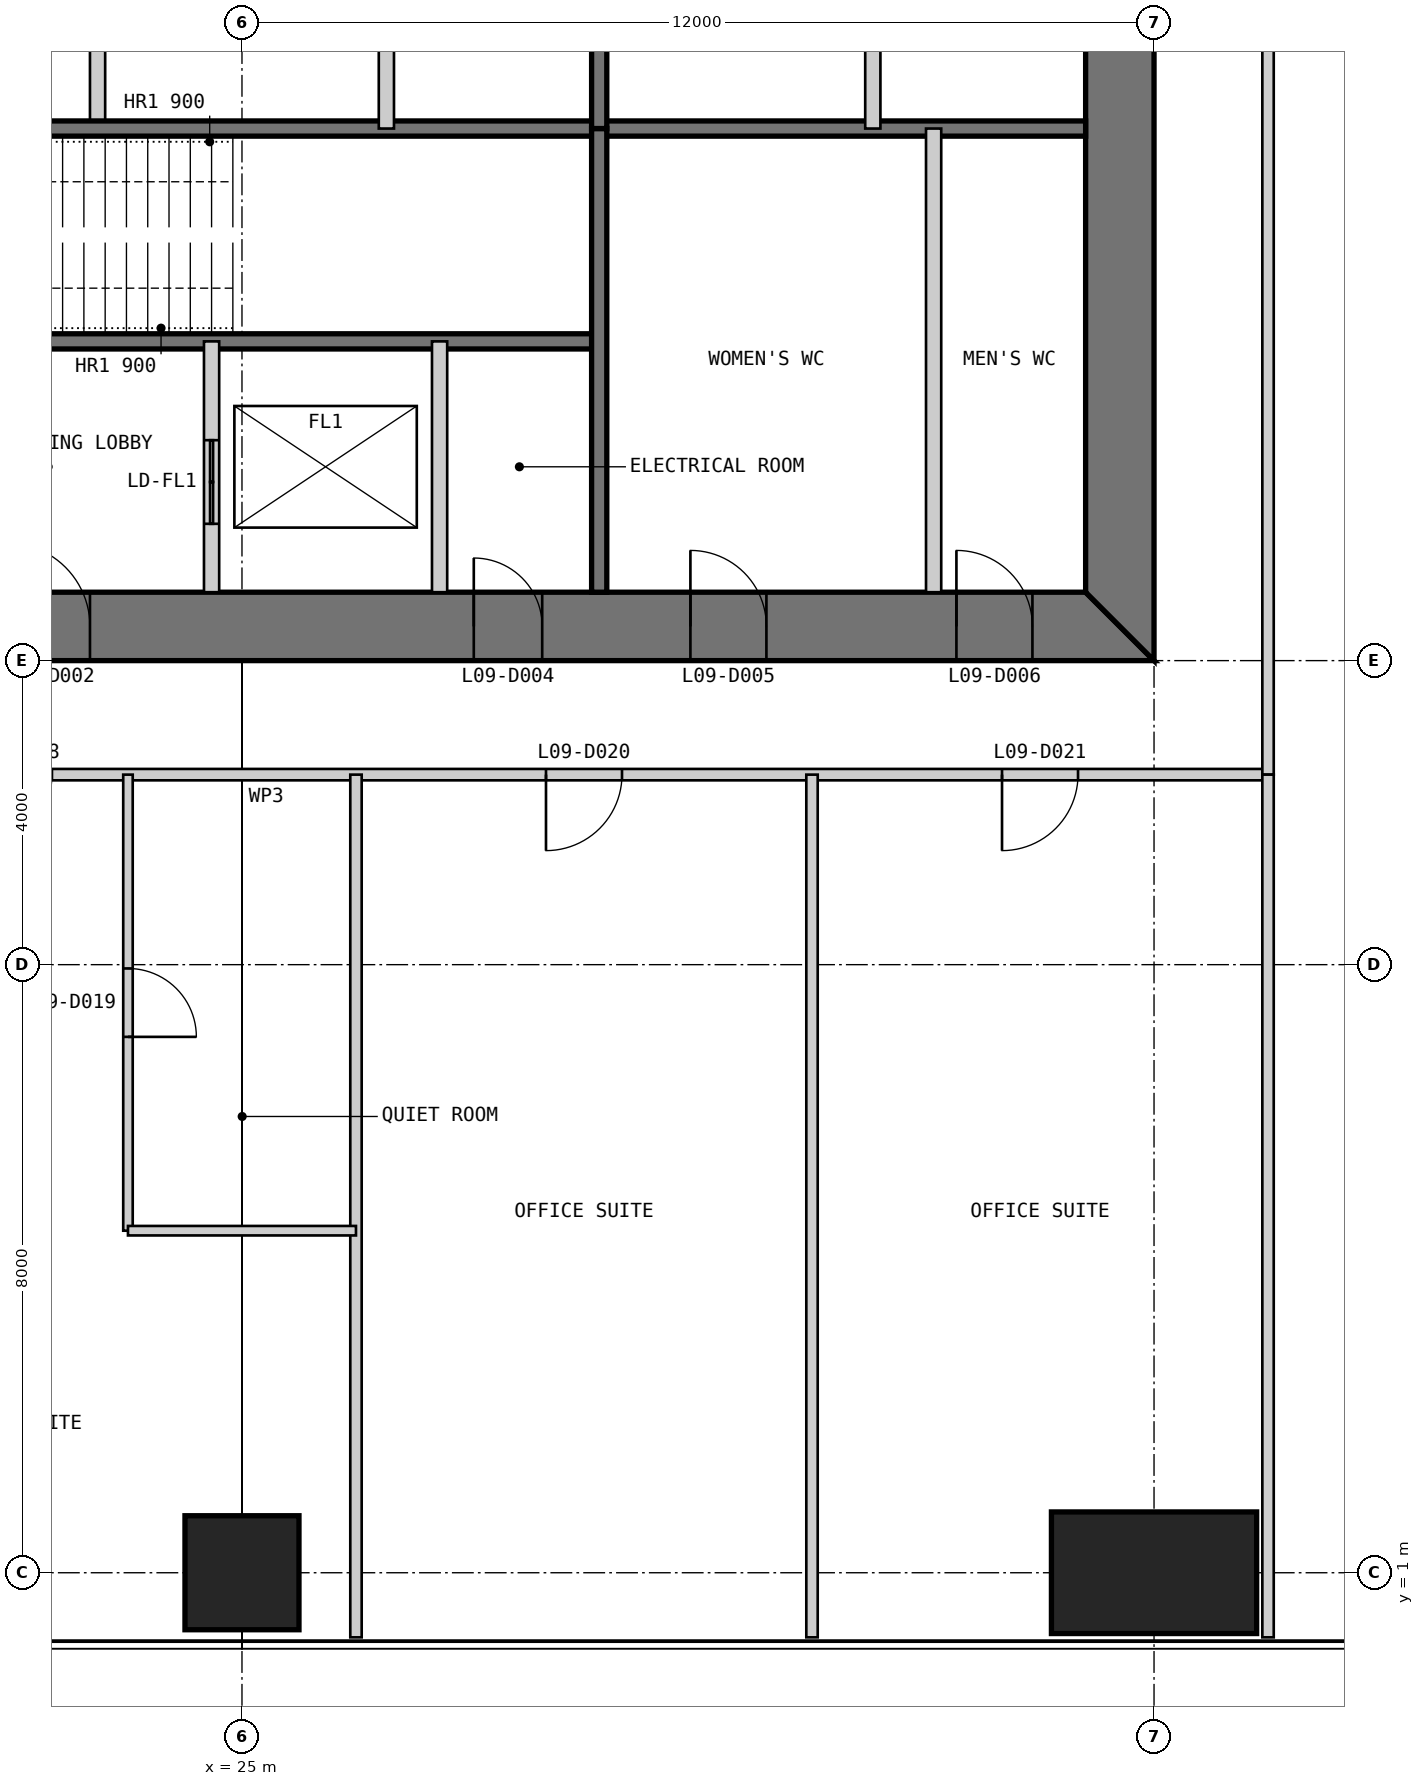
"""IFC4 building model, lengths in metres.
Left out: names, types, materials, properties, quantities, classifications, styles, units other than length and angle.
Written with IfcOpenShell. Run it as: python <this file> out.ifc"""

import sys

from ifc_helpers import new_model, si_unit, direction, frame, frame_2d, origin, origin_2d, place, context, subcontext, project, spatial, polyline, rectangle, outline, extrude, element, fill, save


model = new_model("IFC4")
c1 = context("Model", 3, precision=1e-05, world=origin(), true_north=direction((0.0, 1.0)))
c2 = subcontext(c1, "Body", "Model", "MODEL_VIEW")
j1 = project(units=[si_unit("LENGTHUNIT", "METRE"), si_unit("PLANEANGLEUNIT", "RADIAN")], contexts=[c1])
p1 = place(None, origin())
s1 = spatial("IfcSite", under=j1, at=p1, CompositionType="ELEMENT")
p2 = place(p1, origin())
s2 = spatial("IfcBuilding", under=s1, at=p2, CompositionType="ELEMENT")
p3 = place(p2, frame((0.0, 0.0, 43.0)))
s3 = spatial("IfcBuildingStorey", under=s2, at=p3, CompositionType="ELEMENT", Elevation=43.0)
p4 = place(p3, frame((25.0, 1.0, 0.0), z_axis=(0.0, 0.0, 1.0), x_axis=(1.0, 0.0, 0.0)))
e1 = element("IfcColumn", 1, at=p4, inside=s3, PredefinedType="COLUMN", context=c2, shape_type="SweptSolid", body=[
    extrude(rectangle(XDim=1.5, YDim=1.5, at=origin_2d()), origin(), (0.0, 0.0, 1.0), 4.0),
])
p5 = place(p3, frame((37.0, 1.0, 0.0), z_axis=(0.0, 0.0, 1.0), x_axis=(1.0, 0.0, 0.0)))
e2 = element("IfcColumn", 2, at=p5, inside=s3, PredefinedType="COLUMN", context=c2, shape_type="SweptSolid", body=[
    extrude(rectangle(XDim=2.7, YDim=1.6, at=origin_2d()), origin(), (0.0, 0.0, 1.0), 4.0),
])
p6 = place(p3, frame((13.0, 13.45, 0.0), z_axis=(0.0, 0.0, 1.0), x_axis=(1.0, 0.0, 0.0)))
e3 = element("IfcWall", 3, at=p6, inside=s3, PredefinedType="SHEAR", context=c2, shape_type="SweptSolid", body=[
    extrude(outline(polyline([(0.0, -0.45), (24.0, -0.45), (23.1, 0.45), (0.9, 0.45), (0.0, -0.45)])), origin(), (0.0, 0.0, 1.0), 4.0),
])
p7 = place(p6, frame((4.9, 0.0, 0.0)))
e4 = element("IfcOpeningElement", 4, at=p7, cuts=e3, PredefinedType="OPENING", context=c2, shape_type="SweptSolid", body=[
    extrude(rectangle(XDim=1.0, YDim=2.2, at=frame_2d((0.5, 1.1))), frame((0.0, 0.46, 0.0), z_axis=(0.0, -1.0, 0.0), x_axis=(1.0, 0.0, 0.0)), (0.0, 0.0, 1.0), 0.92),
])
p8 = place(p6, frame((8.9, 0.0, 0.0)))
e5 = element("IfcOpeningElement", 5, at=p8, cuts=e3, PredefinedType="OPENING", context=c2, shape_type="SweptSolid", body=[
    extrude(rectangle(XDim=1.1, YDim=2.2, at=frame_2d((0.55, 1.1))), frame((0.0, 0.46, 0.0), z_axis=(0.0, -1.0, 0.0), x_axis=(1.0, 0.0, 0.0)), (0.0, 0.0, 1.0), 0.92),
])
p9 = place(p6, frame((15.05, 0.0, 0.0)))
e6 = element("IfcOpeningElement", 6, at=p9, cuts=e3, PredefinedType="OPENING", context=c2, shape_type="SweptSolid", body=[
    extrude(rectangle(XDim=0.9, YDim=2.2, at=frame_2d((0.45, 1.1))), frame((0.0, 0.46, 0.0), z_axis=(0.0, -1.0, 0.0), x_axis=(1.0, 0.0, 0.0)), (0.0, 0.0, 1.0), 0.92),
])
p10 = place(p6, frame((17.9, 0.0, 0.0)))
e7 = element("IfcOpeningElement", 7, at=p10, cuts=e3, PredefinedType="OPENING", context=c2, shape_type="SweptSolid", body=[
    extrude(rectangle(XDim=1.0, YDim=2.2, at=frame_2d((0.5, 1.1))), frame((0.0, 0.46, 0.0), z_axis=(0.0, -1.0, 0.0), x_axis=(1.0, 0.0, 0.0)), (0.0, 0.0, 1.0), 0.92),
])
p11 = place(p6, frame((21.4, 0.0, 0.0)))
e8 = element("IfcOpeningElement", 8, at=p11, cuts=e3, PredefinedType="OPENING", context=c2, shape_type="SweptSolid", body=[
    extrude(rectangle(XDim=1.0, YDim=2.2, at=frame_2d((0.5, 1.1))), frame((0.0, 0.46, 0.0), z_axis=(0.0, -1.0, 0.0), x_axis=(1.0, 0.0, 0.0)), (0.0, 0.0, 1.0), 0.92),
])
p12 = place(p3, frame((36.55, 13.9, 0.0), z_axis=(0.0, 0.0, 1.0), x_axis=(0.0, 1.0, 0.0)))
e9 = element("IfcWall", 9, at=p12, inside=s3, PredefinedType="SHEAR", context=c2, shape_type="SweptSolid", body=[
    extrude(outline(polyline([(-0.9, -0.45), (23.1, -0.45), (22.2, 0.45), (0.0, 0.45), (-0.9, -0.45)])), origin(), (0.0, 0.0, 1.0), 4.0),
])
p13 = place(p12, frame((20.2, 0.0, 0.0)))
e10 = element("IfcOpeningElement", 10, at=p13, cuts=e9, PredefinedType="OPENING", context=c2, shape_type="SweptSolid", body=[
    extrude(rectangle(XDim=1.0, YDim=2.2, at=frame_2d((0.5, 1.1))), frame((0.0, 0.46, 0.0), z_axis=(0.0, -1.0, 0.0), x_axis=(1.0, 0.0, 0.0)), (0.0, 0.0, 1.0), 0.92),
])
p14 = place(p12, frame((17.25, 0.0, 0.0)))
e11 = element("IfcOpeningElement", 11, at=p14, cuts=e9, PredefinedType="OPENING", context=c2, shape_type="SweptSolid", body=[
    extrude(rectangle(XDim=0.9, YDim=2.2, at=frame_2d((0.45, 1.1))), frame((0.0, 0.46, 0.0), z_axis=(0.0, -1.0, 0.0), x_axis=(1.0, 0.0, 0.0)), (0.0, 0.0, 1.0), 0.92),
])
p15 = place(p3, frame((23.1, 20.0, 0.0), z_axis=(0.0, 0.0, 1.0), x_axis=(0.0, 1.0, 0.0)))
e12 = element("IfcWall", 12, at=p15, inside=s3, PredefinedType="PARTITIONING", context=c2, shape_type="SweptSolid", body=[
    extrude(rectangle(XDim=10.0, YDim=0.2, at=frame_2d((5.0, 0.0))), origin(), (0.0, 0.0, 1.0), 3.8),
])
p16 = place(p3, frame((20.3, 17.2, 0.0), z_axis=(0.0, 0.0, 1.0), x_axis=(1.0, 0.0, 0.0)))
e13 = element("IfcWall", 13, at=p16, inside=s3, PredefinedType="SOLIDWALL", context=c2, shape_type="SweptSolid", body=[
    extrude(rectangle(XDim=9.4, YDim=0.2, at=frame_2d((4.7, 0.0))), origin(), (0.0, 0.0, 1.0), 3.8),
])
p17 = place(p16, frame((0.25, 0.0, 0.0)))
e14 = element("IfcOpeningElement", 14, at=p17, cuts=e13, PredefinedType="OPENING", context=c2, shape_type="SweptSolid", body=[
    extrude(rectangle(XDim=1.0, YDim=2.2, at=frame_2d((0.5, 1.1))), frame((0.0, 0.11, 0.0), z_axis=(0.0, -1.0, 0.0), x_axis=(1.0, 0.0, 0.0)), (0.0, 0.0, 1.0), 0.22),
])
p18 = place(p3, frame((20.3, 20.0, 0.0), z_axis=(0.0, 0.0, 1.0), x_axis=(1.0, 0.0, 0.0)))
e15 = element("IfcWall", 15, at=p18, inside=s3, PredefinedType="SOLIDWALL", context=c2, shape_type="SweptSolid", body=[
    extrude(rectangle(XDim=15.8, YDim=0.2, at=frame_2d((7.9, 0.0))), origin(), (0.0, 0.0, 1.0), 3.8),
])
p19 = place(p3, frame((24.6, 13.9, 0.0), z_axis=(0.0, 0.0, 1.0), x_axis=(0.0, 1.0, 0.0)))
e16 = element("IfcWall", 16, at=p19, inside=s3, PredefinedType="PARTITIONING", context=c2, shape_type="SweptSolid", body=[
    extrude(rectangle(XDim=3.3, YDim=0.2, at=frame_2d((1.65, 0.0))), origin(), (0.0, 0.0, 1.0), 3.8),
])
p20 = place(p19, frame((0.9, 0.0, 0.0)))
e17 = element("IfcOpeningElement", 17, at=p20, cuts=e16, PredefinedType="OPENING", context=c2, shape_type="SweptSolid", body=[
    extrude(rectangle(XDim=1.1, YDim=2.2, at=frame_2d((0.55, 1.1))), frame((0.0, 0.11, 0.0), z_axis=(0.0, -1.0, 0.0), x_axis=(1.0, 0.0, 0.0)), (0.0, 0.0, 1.0), 0.22),
])
p21 = place(p3, frame((27.6, 13.9, 0.0), z_axis=(0.0, 0.0, 1.0), x_axis=(0.0, 1.0, 0.0)))
e18 = element("IfcWall", 18, at=p21, inside=s3, PredefinedType="PARTITIONING", context=c2, shape_type="SweptSolid", body=[
    extrude(rectangle(XDim=3.3, YDim=0.2, at=frame_2d((1.65, 0.0))), origin(), (0.0, 0.0, 1.0), 3.8),
])
p22 = place(p3, frame((29.7, 13.9, 0.0), z_axis=(0.0, 0.0, 1.0), x_axis=(0.0, 1.0, 0.0)))
e19 = element("IfcWall", 19, at=p22, inside=s3, PredefinedType="SOLIDWALL", context=c2, shape_type="SweptSolid", body=[
    extrude(rectangle(XDim=6.1, YDim=0.2, at=frame_2d((3.05, 0.0))), origin(), (0.0, 0.0, 1.0), 3.8),
])
p23 = place(p3, frame((34.1, 13.9, 0.0), z_axis=(0.0, 0.0, 1.0), x_axis=(0.0, 1.0, 0.0)))
e20 = element("IfcWall", 20, at=p23, inside=s3, PredefinedType="PARTITIONING", context=c2, shape_type="SweptSolid", body=[
    extrude(rectangle(XDim=6.1, YDim=0.2, at=frame_2d((3.05, 0.0))), origin(), (0.0, 0.0, 1.0), 3.8),
])
p24 = place(p3, frame((33.3, 36.1, 0.0), z_axis=(0.0, 0.0, 1.0), x_axis=(0.0, -1.0, 0.0)))
e21 = element("IfcWall", 21, at=p24, inside=s3, PredefinedType="PARTITIONING", context=c2, shape_type="SweptSolid", body=[
    extrude(rectangle(XDim=16.1, YDim=0.2, at=frame_2d((8.05, 0.0))), origin(), (0.0, 0.0, 1.0), 3.8),
])
p25 = place(p3, frame((29.7, 36.1, 0.0), z_axis=(0.0, 0.0, 1.0), x_axis=(0.0, -1.0, 0.0)))
e22 = element("IfcWall", 22, at=p25, inside=s3, PredefinedType="SOLIDWALL", context=c2, shape_type="SweptSolid", body=[
    extrude(rectangle(XDim=16.1, YDim=0.2, at=frame_2d((8.05, 0.0))), origin(), (0.0, 0.0, 1.0), 3.8),
])
p26 = place(p3, frame((26.9, 30.0, 0.0), z_axis=(0.0, 0.0, 1.0), x_axis=(0.0, -1.0, 0.0)))
e23 = element("IfcWall", 23, at=p26, inside=s3, PredefinedType="PARTITIONING", context=c2, shape_type="SweptSolid", body=[
    extrude(rectangle(XDim=10.0, YDim=0.2, at=frame_2d((5.0, 0.0))), origin(), (0.0, 0.0, 1.0), 3.8),
])
p27 = place(p3, frame((11.5, 11.5, 0.0), z_axis=(0.0, 0.0, 1.0), x_axis=(1.0, 0.0, 0.0)))
e24 = element("IfcWall", 24, at=p27, inside=s3, PredefinedType="PARTITIONING", context=c2, shape_type="SweptSolid", body=[
    extrude(rectangle(XDim=27.0, YDim=0.15, at=frame_2d((13.5, 0.0))), origin(), (0.0, 0.0, 1.0), 3.85),
])
p28 = place(p27, frame((4.0, 0.0, 0.0)))
e25 = element("IfcOpeningElement", 25, at=p28, cuts=e24, PredefinedType="OPENING", context=c2, shape_type="SweptSolid", body=[
    extrude(rectangle(XDim=1.0, YDim=2.2, at=frame_2d((0.5, 1.1))), frame((0.0, 0.085, 0.0), z_axis=(0.0, -1.0, 0.0), x_axis=(1.0, 0.0, 0.0)), (0.0, 0.0, 1.0), 0.17),
])
p29 = place(p27, frame((10.0, 0.0, 0.0)))
e26 = element("IfcOpeningElement", 26, at=p29, cuts=e24, PredefinedType="OPENING", context=c2, shape_type="SweptSolid", body=[
    extrude(rectangle(XDim=1.0, YDim=2.2, at=frame_2d((0.5, 1.1))), frame((0.0, 0.085, 0.0), z_axis=(0.0, -1.0, 0.0), x_axis=(1.0, 0.0, 0.0)), (0.0, 0.0, 1.0), 0.17),
])
p30 = place(p27, frame((17.5, 0.0, 0.0)))
e27 = element("IfcOpeningElement", 27, at=p30, cuts=e24, PredefinedType="OPENING", context=c2, shape_type="SweptSolid", body=[
    extrude(rectangle(XDim=1.0, YDim=2.2, at=frame_2d((0.5, 1.1))), frame((0.0, 0.085, 0.0), z_axis=(0.0, -1.0, 0.0), x_axis=(1.0, 0.0, 0.0)), (0.0, 0.0, 1.0), 0.17),
])
p31 = place(p27, frame((23.5, 0.0, 0.0)))
e28 = element("IfcOpeningElement", 28, at=p31, cuts=e24, PredefinedType="OPENING", context=c2, shape_type="SweptSolid", body=[
    extrude(rectangle(XDim=1.0, YDim=2.2, at=frame_2d((0.5, 1.1))), frame((0.0, 0.085, 0.0), z_axis=(0.0, -1.0, 0.0), x_axis=(1.0, 0.0, 0.0)), (0.0, 0.0, 1.0), 0.17),
])
p32 = place(p3, frame((23.5, 5.5, 0.0), z_axis=(0.0, 0.0, 1.0), x_axis=(0.0, 1.0, 0.0)))
e29 = element("IfcWall", 29, at=p32, inside=s3, PredefinedType="PARTITIONING", context=c2, shape_type="SweptSolid", body=[
    extrude(rectangle(XDim=6.0, YDim=0.125, at=frame_2d((3.0, 0.0))), origin(), (0.0, 0.0, 1.0), 3.85),
])
p33 = place(p32, frame((2.55, 0.0, 0.0)))
e30 = element("IfcOpeningElement", 30, at=p33, cuts=e29, PredefinedType="OPENING", context=c2, shape_type="SweptSolid", body=[
    extrude(rectangle(XDim=0.9, YDim=2.2, at=frame_2d((0.45, 1.1))), frame((0.0, 0.073, 0.0), z_axis=(0.0, -1.0, 0.0), x_axis=(1.0, 0.0, 0.0)), (0.0, 0.0, 1.0), 0.145),
])
for number, where, z_axis, x_axis in (
    (31, (26.5, 0.15, 0.0), (0.0, 0.0, 1.0), (0.0, 1.0, 0.0)),
    (32, (32.5, 0.15, 0.0), (0.0, 0.0, 1.0), (0.0, 1.0, 0.0)),
):
    element("IfcWall", number, at=place(p3, frame(where, z_axis=z_axis, x_axis=x_axis)), inside=s3, PredefinedType="PARTITIONING", context=c2, shape_type="SweptSolid", body=[
        extrude(rectangle(XDim=11.35, YDim=0.15, at=frame_2d((5.675, 0.0))), origin(), (0.0, 0.0, 1.0), 3.85),
    ])
p34 = place(p3, frame((23.5, 5.5, 0.0), z_axis=(0.0, 0.0, 1.0), x_axis=(1.0, 0.0, 0.0)))
e33 = element("IfcWall", 33, at=p34, inside=s3, PredefinedType="PARTITIONING", context=c2, shape_type="SweptSolid", body=[
    extrude(rectangle(XDim=3.0, YDim=0.125, at=frame_2d((1.5, 0.0))), origin(), (0.0, 0.0, 1.0), 3.85),
])
p35 = place(p3, frame((38.5, 11.5, 0.0), z_axis=(0.0, 0.0, 1.0), x_axis=(0.0, 1.0, 0.0)))
e34 = element("IfcWall", 34, at=p35, inside=s3, PredefinedType="PARTITIONING", context=c2, shape_type="SweptSolid", body=[
    extrude(rectangle(XDim=27.0, YDim=0.15, at=frame_2d((13.5, 0.0))), origin(), (0.0, 0.0, 1.0), 3.85),
])
p36 = place(p35, frame((11.5, 0.0, 0.0)))
e35 = element("IfcOpeningElement", 35, at=p36, cuts=e34, PredefinedType="OPENING", context=c2, shape_type="SweptSolid", body=[
    extrude(rectangle(XDim=1.0, YDim=2.2, at=frame_2d((0.5, 1.1))), frame((0.0, 0.085, 0.0), z_axis=(0.0, -1.0, 0.0), x_axis=(1.0, 0.0, 0.0)), (0.0, 0.0, 1.0), 0.17),
])
p37 = place(p3, frame((38.5, 0.15, 0.0), z_axis=(0.0, 0.0, 1.0), x_axis=(0.0, 1.0, 0.0)))
e36 = element("IfcWall", 36, at=p37, inside=s3, PredefinedType="PARTITIONING", context=c2, shape_type="SweptSolid", body=[
    extrude(rectangle(XDim=11.35, YDim=0.15, at=frame_2d((5.675, 0.0))), origin(), (0.0, 0.0, 1.0), 3.85),
])
p38 = place(p8, origin())
e37 = element("IfcDoor", 37, at=p38, inside=s3, OperationType="SINGLE_SWING_LEFT", PredefinedType="DOOR", context=c2, shape_type="SweptSolid", body=[
    extrude(rectangle(XDim=1.1, YDim=2.2, at=frame_2d((0.55, 1.1))), frame((0.0, 0.025, 0.0), z_axis=(0.0, -1.0, 0.0), x_axis=(1.0, 0.0, 0.0)), (0.0, 0.0, 1.0), 0.05),
    extrude(outline(polyline([(0.0, 0.0), (0.04, 0.0), (0.04, 2.16), (1.06, 2.16), (1.06, 0.0), (1.1, 0.0), (1.1, 2.2), (0.0, 2.2), (0.0, 0.0)])), frame((0.0, 0.3, 0.0), z_axis=(0.0, -1.0, 0.0), x_axis=(1.0, 0.0, 0.0)), (0.0, 0.0, 1.0), 0.6),
])
fill(e5, e37)
p39 = place(p9, origin())
e38 = element("IfcDoor", 38, at=p39, inside=s3, OperationType="SINGLE_SWING_LEFT", PredefinedType="DOOR", context=c2, shape_type="SweptSolid", body=[
    extrude(rectangle(XDim=0.9, YDim=2.2, at=frame_2d((0.45, 1.1))), frame((0.0, 0.025, 0.0), z_axis=(0.0, -1.0, 0.0), x_axis=(1.0, 0.0, 0.0)), (0.0, 0.0, 1.0), 0.05),
    extrude(outline(polyline([(0.0, 0.0), (0.04, 0.0), (0.04, 2.16), (0.86, 2.16), (0.86, 0.0), (0.9, 0.0), (0.9, 2.2), (0.0, 2.2), (0.0, 0.0)])), frame((0.0, 0.3, 0.0), z_axis=(0.0, -1.0, 0.0), x_axis=(1.0, 0.0, 0.0)), (0.0, 0.0, 1.0), 0.6),
])
fill(e6, e38)
p40 = place(p10, origin())
e39 = element("IfcDoor", 39, at=p40, inside=s3, OperationType="SINGLE_SWING_LEFT", PredefinedType="DOOR", context=c2, shape_type="SweptSolid", body=[
    extrude(rectangle(XDim=1.0, YDim=2.2, at=frame_2d((0.5, 1.1))), frame((0.0, 0.025, 0.0), z_axis=(0.0, -1.0, 0.0), x_axis=(1.0, 0.0, 0.0)), (0.0, 0.0, 1.0), 0.05),
    extrude(outline(polyline([(0.0, 0.0), (0.04, 0.0), (0.04, 2.16), (0.96, 2.16), (0.96, 0.0), (1.0, 0.0), (1.0, 2.2), (0.0, 2.2), (0.0, 0.0)])), frame((0.0, 0.3, 0.0), z_axis=(0.0, -1.0, 0.0), x_axis=(1.0, 0.0, 0.0)), (0.0, 0.0, 1.0), 0.6),
])
fill(e7, e39)
p41 = place(p11, origin())
e40 = element("IfcDoor", 40, at=p41, inside=s3, OperationType="SINGLE_SWING_LEFT", PredefinedType="DOOR", context=c2, shape_type="SweptSolid", body=[
    extrude(rectangle(XDim=1.0, YDim=2.2, at=frame_2d((0.5, 1.1))), frame((0.0, 0.025, 0.0), z_axis=(0.0, -1.0, 0.0), x_axis=(1.0, 0.0, 0.0)), (0.0, 0.0, 1.0), 0.05),
    extrude(outline(polyline([(0.0, 0.0), (0.04, 0.0), (0.04, 2.16), (0.96, 2.16), (0.96, 0.0), (1.0, 0.0), (1.0, 2.2), (0.0, 2.2), (0.0, 0.0)])), frame((0.0, 0.3, 0.0), z_axis=(0.0, -1.0, 0.0), x_axis=(1.0, 0.0, 0.0)), (0.0, 0.0, 1.0), 0.6),
])
fill(e8, e40)
p42 = place(p33, frame((0.9, 0.0, 0.0), z_axis=(0.0, 0.0, 1.0), x_axis=(-1.0, 0.0, 0.0)))
e41 = element("IfcDoor", 41, at=p42, inside=s3, OperationType="SINGLE_SWING_RIGHT", PredefinedType="DOOR", context=c2, shape_type="SweptSolid", body=[
    extrude(rectangle(XDim=0.9, YDim=2.2, at=frame_2d((0.45, 1.1))), frame((0.0, 0.025, 0.0), z_axis=(0.0, -1.0, 0.0), x_axis=(1.0, 0.0, 0.0)), (0.0, 0.0, 1.0), 0.05),
])
fill(e30, e41)
p43 = place(p30, frame((1.0, 0.0, 0.0), z_axis=(0.0, 0.0, 1.0), x_axis=(-1.0, 0.0, 0.0)))
e42 = element("IfcDoor", 42, at=p43, inside=s3, OperationType="SINGLE_SWING_RIGHT", PredefinedType="DOOR", context=c2, shape_type="SweptSolid", body=[
    extrude(rectangle(XDim=1.0, YDim=2.2, at=frame_2d((0.5, 1.1))), frame((0.0, 0.025, 0.0), z_axis=(0.0, -1.0, 0.0), x_axis=(1.0, 0.0, 0.0)), (0.0, 0.0, 1.0), 0.05),
])
fill(e27, e42)
p44 = place(p31, frame((1.0, 0.0, 0.0), z_axis=(0.0, 0.0, 1.0), x_axis=(-1.0, 0.0, 0.0)))
e43 = element("IfcDoor", 43, at=p44, inside=s3, OperationType="SINGLE_SWING_RIGHT", PredefinedType="DOOR", context=c2, shape_type="SweptSolid", body=[
    extrude(rectangle(XDim=1.0, YDim=2.2, at=frame_2d((0.5, 1.1))), frame((0.0, 0.025, 0.0), z_axis=(0.0, -1.0, 0.0), x_axis=(1.0, 0.0, 0.0)), (0.0, 0.0, 1.0), 0.05),
])
fill(e28, e43)
p45 = place(p20, origin())
e44 = element("IfcDoor", 44, at=p45, inside=s3, OperationType="DOUBLE_DOOR_SLIDING", PredefinedType="DOOR", context=c2, shape_type="SweptSolid", body=[
    extrude(rectangle(XDim=1.1, YDim=2.2, at=frame_2d((0.55, 1.1))), frame((0.0, 0.025, 0.0), z_axis=(0.0, -1.0, 0.0), x_axis=(1.0, 0.0, 0.0)), (0.0, 0.0, 1.0), 0.05),
])
fill(e17, e44)
save(model, sys.argv[1])
